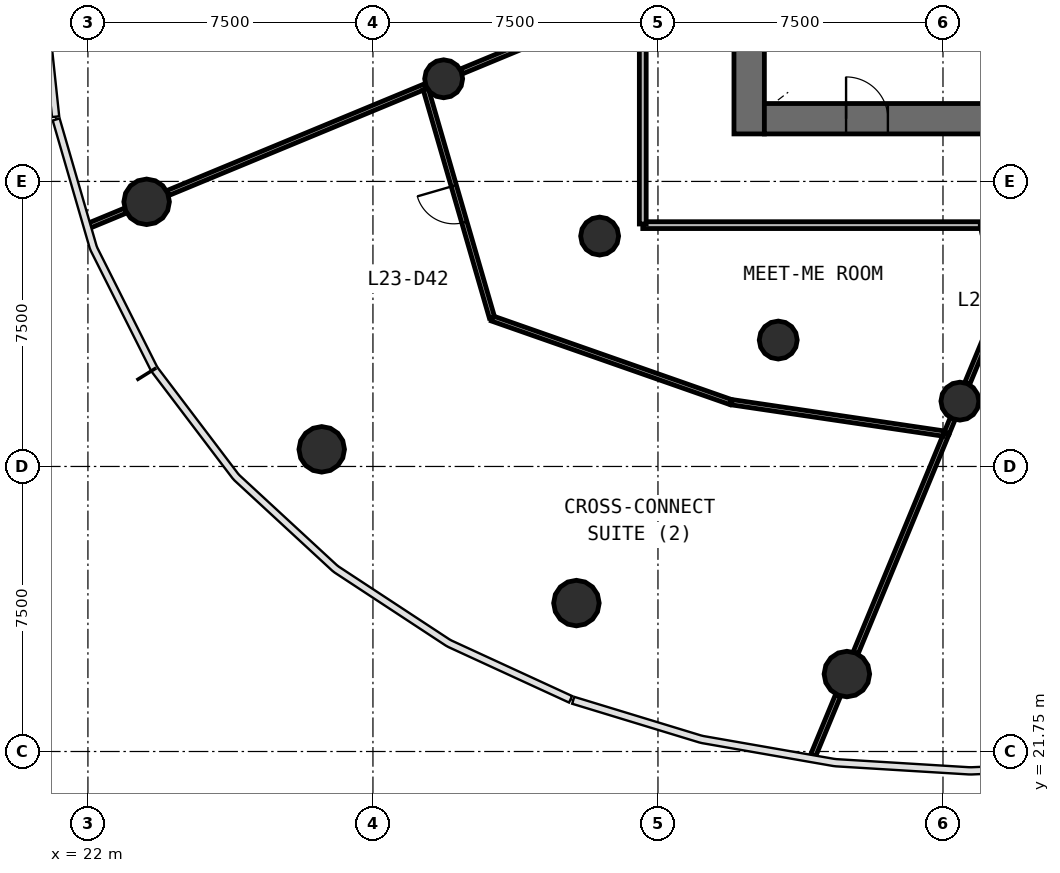
"""IFC4 building model, lengths in metres.
Left out: names, types, materials, properties, quantities, classifications, styles, units other than length and angle.
Written with IfcOpenShell. Run it as: python <this file> out.ifc"""

import sys

from ifc_helpers import new_model, si_unit, direction, frame, frame_2d, origin, origin_2d, place, context, subcontext, project, spatial, rectangle, circle, extrude, source, transform, mapped, element, fill, save


model = new_model("IFC4")
c1 = context("Model", 3, precision=1e-05, world=origin(), true_north=direction((0.0, 1.0)))
c2 = subcontext(c1, "Body", "Model", "MODEL_VIEW")
j1 = project(units=[si_unit("LENGTHUNIT", "METRE"), si_unit("PLANEANGLEUNIT", "RADIAN")], contexts=[c1])
p1 = place(None, origin())
s1 = spatial("IfcSite", under=j1, at=p1, CompositionType="ELEMENT")
p2 = place(p1, origin())
s2 = spatial("IfcBuilding", under=s1, at=p2, CompositionType="ELEMENT")
p3 = place(p2, frame((0.0, 0.0, 100.3)))
s3 = spatial("IfcBuildingStorey", under=s2, at=p3, CompositionType="ELEMENT", Elevation=100.3)
p4 = place(p3, frame((39.4, 58.0, 0.0), z_axis=(0.0, 0.0, 1.0), x_axis=(0.0, -1.0, 0.0)))
e1 = element("IfcWall", 1, at=p4, inside=s3, PredefinedType="SHEAR", context=c2, shape_type="SweptSolid", body=[
    extrude(rectangle(XDim=20.0, YDim=0.8, at=frame_2d((10.0, 0.0))), origin(), (0.0, 0.0, 1.0), 4.1),
])
p5 = place(p4, frame((9.1, 0.0, 0.0)))
e2 = element("IfcOpeningElement", 2, at=p5, cuts=e1, PredefinedType="OPENING", context=c2, shape_type="SweptSolid", body=[
    extrude(rectangle(XDim=1.8, YDim=2.1, at=frame_2d((0.9, 1.05))), frame((0.0, 0.41, 0.0), z_axis=(0.0, -1.0, 0.0), x_axis=(1.0, 0.0, 0.0)), (0.0, 0.0, 1.0), 0.82),
])
p6 = place(p3, frame((39.8, 38.4, 0.0), z_axis=(0.0, 0.0, 1.0), x_axis=(1.0, 0.0, 0.0)))
e3 = element("IfcWall", 3, at=p6, inside=s3, PredefinedType="SHEAR", context=c2, shape_type="SweptSolid", body=[
    extrude(rectangle(XDim=24.4, YDim=0.8, at=frame_2d((12.2, 0.0))), origin(), (0.0, 0.0, 1.0), 4.1),
])
p7 = place(p6, frame((21.65, 0.0, 0.0)))
e4 = element("IfcOpeningElement", 4, at=p7, cuts=e3, PredefinedType="OPENING", context=c2, shape_type="SweptSolid", body=[
    extrude(rectangle(XDim=1.1, YDim=2.1, at=frame_2d((0.55, 1.05))), frame((0.0, 0.41, 0.0), z_axis=(0.0, -1.0, 0.0), x_axis=(1.0, 0.0, 0.0)), (0.0, 0.0, 1.0), 0.82),
])
p8 = place(p6, frame((2.15, 0.0, 0.0)))
e5 = element("IfcOpeningElement", 5, at=p8, cuts=e3, PredefinedType="OPENING", context=c2, shape_type="SweptSolid", body=[
    extrude(rectangle(XDim=1.1, YDim=2.1, at=frame_2d((0.55, 1.05))), frame((0.0, 0.41, 0.0), z_axis=(0.0, -1.0, 0.0), x_axis=(1.0, 0.0, 0.0)), (0.0, 0.0, 1.0), 0.82),
])
m1 = source(origin(), c2, "Body", "SweptSolid", [
    extrude(circle(Radius=0.6, at=origin_2d()), origin(), (0.0, 0.0, 1.0), 4.1),
])
for number, where, z_axis, x_axis in (
    (6, (23.544, 36.213, 0.0), (0.0, 0.0, 1.0), (1.0, 0.0, 0.0)),
    (7, (28.152, 29.701, 0.0), (0.0, 0.0, 1.0), (1.0, 0.0, 0.0)),
    (8, (34.854, 25.655, 0.0), (0.0, 0.0, 1.0), (1.0, 0.0, 0.0)),
    (9, (41.971, 23.788, 0.0), (0.0, 0.0, 1.0), (1.0, 0.0, 0.0)),
):
    element("IfcColumn", number, at=place(p3, frame(where, z_axis=z_axis, x_axis=x_axis)), inside=s3, PredefinedType="COLUMN", context=c2, shape_type="MappedRepresentation", body=[
        mapped(m1, transform((0.0, 0.0, 0.0), scale=1.0)),
    ])
m2 = source(origin(), c2, "Body", "SweptSolid", [
    extrude(circle(Radius=0.5, at=origin_2d()), origin(), (0.0, 0.0, 1.0), 4.1),
])
for number, where, z_axis, x_axis in (
    (10, (31.361, 39.451, 0.0), (0.0, 0.0, 1.0), (1.0, 0.0, 0.0)),
    (11, (35.465, 35.312, 0.0), (0.0, 0.0, 1.0), (1.0, 0.0, 0.0)),
    (12, (40.165, 32.576, 0.0), (0.0, 0.0, 1.0), (1.0, 0.0, 0.0)),
    (13, (44.945, 30.969, 0.0), (0.0, 0.0, 1.0), (1.0, 0.0, 0.0)),
):
    element("IfcColumn", number, at=place(p3, frame(where, z_axis=z_axis, x_axis=x_axis)), inside=s3, PredefinedType="COLUMN", context=c2, shape_type="MappedRepresentation", body=[
        mapped(m2, transform((0.0, 0.0, 0.0), scale=1.0)),
    ])
p9 = place(p3, frame((67.4, 35.6, 0.0), z_axis=(0.0, 0.0, 1.0), x_axis=(-1.0, 0.0, 0.0)))
e14 = element("IfcWall", 14, at=p9, inside=s3, PredefinedType="PARTITIONING", context=c2, shape_type="SweptSolid", body=[
    extrude(rectangle(XDim=30.8, YDim=0.18, at=frame_2d((15.4, 0.0))), origin(), (0.0, 0.0, 1.0), 2.9),
])
p10 = place(p9, frame((9.05, 0.0, 0.0)))
e15 = element("IfcOpeningElement", 15, at=p10, cuts=e14, PredefinedType="OPENING", context=c2, shape_type="SweptSolid", body=[
    extrude(rectangle(XDim=0.9, YDim=2.1, at=frame_2d((0.45, 1.05))), frame((0.0, 0.1, 0.0), z_axis=(0.0, -1.0, 0.0), x_axis=(1.0, 0.0, 0.0)), (0.0, 0.0, 1.0), 0.2),
])
p11 = place(p9, frame((6.05, 0.0, 0.0)))
e16 = element("IfcOpeningElement", 16, at=p11, cuts=e14, PredefinedType="OPENING", context=c2, shape_type="SweptSolid", body=[
    extrude(rectangle(XDim=0.9, YDim=2.1, at=frame_2d((0.45, 1.05))), frame((0.0, 0.1, 0.0), z_axis=(0.0, -1.0, 0.0), x_axis=(1.0, 0.0, 0.0)), (0.0, 0.0, 1.0), 0.2),
])
p12 = place(p9, frame((2.45, 0.0, 0.0)))
e17 = element("IfcOpeningElement", 17, at=p12, cuts=e14, PredefinedType="OPENING", context=c2, shape_type="SweptSolid", body=[
    extrude(rectangle(XDim=0.9, YDim=2.1, at=frame_2d((0.45, 1.05))), frame((0.0, 0.1, 0.0), z_axis=(0.0, -1.0, 0.0), x_axis=(1.0, 0.0, 0.0)), (0.0, 0.0, 1.0), 0.2),
])
p13 = place(p9, frame((20.95, 0.0, 0.0)))
e18 = element("IfcOpeningElement", 18, at=p13, cuts=e14, PredefinedType="OPENING", context=c2, shape_type="SweptSolid", body=[
    extrude(rectangle(XDim=1.0, YDim=2.1, at=frame_2d((0.5, 1.05))), frame((0.0, 0.1, 0.0), z_axis=(0.0, -1.0, 0.0), x_axis=(1.0, 0.0, 0.0)), (0.0, 0.0, 1.0), 0.2),
])
p14 = place(p9, frame((14.95, 0.0, 0.0)))
e19 = element("IfcOpeningElement", 19, at=p14, cuts=e14, PredefinedType="OPENING", context=c2, shape_type="SweptSolid", body=[
    extrude(rectangle(XDim=1.0, YDim=2.1, at=frame_2d((0.5, 1.05))), frame((0.0, 0.1, 0.0), z_axis=(0.0, -1.0, 0.0), x_axis=(1.0, 0.0, 0.0)), (0.0, 0.0, 1.0), 0.2),
])
p15 = place(p9, frame((12.55, 0.0, 0.0)))
e20 = element("IfcOpeningElement", 20, at=p15, cuts=e14, PredefinedType="OPENING", context=c2, shape_type="SweptSolid", body=[
    extrude(rectangle(XDim=1.0, YDim=2.1, at=frame_2d((0.5, 1.05))), frame((0.0, 0.1, 0.0), z_axis=(0.0, -1.0, 0.0), x_axis=(1.0, 0.0, 0.0)), (0.0, 0.0, 1.0), 0.2),
])
p16 = place(p3, frame((36.6, 35.63, 0.0), z_axis=(0.0, 0.0, 1.0), x_axis=(0.0, 1.0, 0.0)))
e21 = element("IfcWall", 21, at=p16, inside=s3, PredefinedType="PARTITIONING", context=c2, shape_type="SweptSolid", body=[
    extrude(rectangle(XDim=23.583, YDim=0.18, at=frame_2d((11.791, 0.0))), origin(), (0.0, 0.0, 1.0), 2.9),
])
p17 = place(p16, frame((11.333, 0.0, 0.0)))
e22 = element("IfcOpeningElement", 22, at=p17, cuts=e21, PredefinedType="OPENING", context=c2, shape_type="SweptSolid", body=[
    extrude(rectangle(XDim=1.0, YDim=2.1, at=frame_2d((0.5, 1.05))), frame((0.0, 0.1, 0.0), z_axis=(0.0, -1.0, 0.0), x_axis=(1.0, 0.0, 0.0)), (0.0, 0.0, 1.0), 0.2),
])
p18 = place(p16, frame((9.133, 0.0, 0.0)))
e23 = element("IfcOpeningElement", 23, at=p18, cuts=e21, PredefinedType="OPENING", context=c2, shape_type="SweptSolid", body=[
    extrude(rectangle(XDim=1.0, YDim=2.1, at=frame_2d((0.5, 1.05))), frame((0.0, 0.1, 0.0), z_axis=(0.0, -1.0, 0.0), x_axis=(1.0, 0.0, 0.0)), (0.0, 0.0, 1.0), 0.2),
])
p19 = place(p3, frame((30.87, 39.248, 0.0), z_axis=(0.0, 0.0, 1.0), x_axis=(-0.923871790576, -0.382702122514, 0.0)))
e24 = element("IfcWall", 24, at=p19, inside=s3, PredefinedType="PARTITIONING", context=c2, shape_type="SweptSolid", body=[
    extrude(rectangle(XDim=7.324, YDim=0.14, at=frame_2d((3.662, 0.0))), origin(), (0.0, 0.0, 1.0), 2.9),
])
p20 = place(p3, frame((32.639, 33.144, 0.0), z_axis=(0.0, 0.0, 1.0), x_axis=(0.943712844309, -0.330765880173, 0.0)))
e25 = element("IfcWall", 25, at=p20, inside=s3, PredefinedType="PARTITIONING", context=c2, shape_type="SweptSolid", body=[
    extrude(rectangle(XDim=6.648, YDim=0.14, at=frame_2d((3.324, 0.0))), origin(), (0.0, 0.0, 1.0), 2.9),
])
p21 = place(p3, frame((32.631, 33.173, 0.0), z_axis=(0.0, 0.0, 1.0), x_axis=(-0.278343340878, 0.960481641984, 0.0)))
e26 = element("IfcWall", 26, at=p21, inside=s3, PredefinedType="PARTITIONING", context=c2, shape_type="SweptSolid", body=[
    extrude(rectangle(XDim=6.255, YDim=0.14, at=frame_2d((3.127, 0.0))), origin(), (0.0, 0.0, 1.0), 2.9),
])
p22 = place(p21, frame((2.604, 0.0, 0.0)))
e27 = element("IfcOpeningElement", 27, at=p22, cuts=e26, PredefinedType="OPENING", context=c2, shape_type="SweptSolid", body=[
    extrude(rectangle(XDim=1.0, YDim=2.1, at=frame_2d((0.5, 1.05))), frame((0.0, 0.08, 0.0), z_axis=(0.0, -1.0, 0.0), x_axis=(1.0, 0.0, 0.0)), (0.0, 0.0, 1.0), 0.16),
])
p23 = place(p3, frame((44.588, 30.106, 0.0), z_axis=(0.0, 0.0, 1.0), x_axis=(-0.382687319502, -0.923877922397, 0.0)))
e28 = element("IfcWall", 28, at=p23, inside=s3, PredefinedType="PARTITIONING", context=c2, shape_type="SweptSolid", body=[
    extrude(rectangle(XDim=6.234, YDim=0.14, at=frame_2d((3.117, 0.0))), origin(), (0.0, 0.0, 1.0), 2.9),
])
p24 = place(p3, frame((38.943, 30.94, 0.0), z_axis=(0.0, 0.0, 1.0), x_axis=(0.98924251215, -0.146284832283, 0.0)))
e29 = element("IfcWall", 29, at=p24, inside=s3, PredefinedType="PARTITIONING", context=c2, shape_type="SweptSolid", body=[
    extrude(rectangle(XDim=5.634, YDim=0.14, at=frame_2d((2.817, 0.0))), origin(), (0.0, 0.0, 1.0), 2.9),
])
p25 = place(p3, frame((36.51, 41.584, 0.0), z_axis=(0.0, 0.0, 1.0), x_axis=(-0.923890025086, -0.382658100067, 0.0)))
e30 = element("IfcWall", 30, at=p25, inside=s3, PredefinedType="PARTITIONING", context=c2, shape_type="SweptSolid", body=[
    extrude(rectangle(XDim=5.068, YDim=0.14, at=frame_2d((2.534, 0.0))), origin(), (0.0, 0.0, 1.0), 2.9),
])
p26 = place(p3, frame((46.826, 35.51, 0.0), z_axis=(0.0, 0.0, 1.0), x_axis=(-0.382672831764, -0.923883923353, 0.0)))
e31 = element("IfcWall", 31, at=p26, inside=s3, PredefinedType="PARTITIONING", context=c2, shape_type="SweptSolid", body=[
    extrude(rectangle(XDim=4.41, YDim=0.14, at=frame_2d((2.205, 0.0))), origin(), (0.0, 0.0, 1.0), 2.9),
])
p27 = place(p3, frame((41.74, 23.229, 0.0), z_axis=(0.0, 0.0, 1.0), x_axis=(-0.382769756697, -0.923843771077, 0.0)))
e32 = element("IfcWall", 32, at=p27, inside=s3, PredefinedType="PARTITIONING", context=c2, shape_type="SweptSolid", body=[
    extrude(rectangle(XDim=1.719, YDim=0.14, at=frame_2d((0.86, 0.0))), origin(), (0.0, 0.0, 1.0), 2.9),
])
p28 = place(p3, frame((22.986, 35.982, 0.0), z_axis=(0.0, 0.0, 1.0), x_axis=(-0.923909071339, -0.38261211154, 0.0)))
e33 = element("IfcWall", 33, at=p28, inside=s3, PredefinedType="PARTITIONING", context=c2, shape_type="SweptSolid", body=[
    extrude(rectangle(XDim=1.021, YDim=0.14, at=frame_2d((0.511, 0.0))), origin(), (0.0, 0.0, 1.0), 2.9),
])
p29 = place(p3, frame((44.752, 30.502, 0.0), z_axis=(0.0, 0.0, 1.0), x_axis=(-0.382441868588, -0.923979554509, 0.0)))
e34 = element("IfcWall", 34, at=p29, inside=s3, PredefinedType="PARTITIONING", context=c2, shape_type="SweptSolid", body=[
    extrude(rectangle(XDim=0.399, YDim=0.14, at=frame_2d((0.199, 0.0))), origin(), (0.0, 0.0, 1.0), 2.9),
])
m3 = source(origin(), c2, "Body", "SweptSolid", [
    extrude(rectangle(XDim=1.1, YDim=2.1, at=frame_2d((0.55, 1.05))), frame((0.0, 0.025, 0.0), z_axis=(0.0, -1.0, 0.0), x_axis=(1.0, 0.0, 0.0)), (0.0, 0.0, 1.0), 0.05),
])
p30 = place(p8, origin())
e35 = element("IfcDoor", 35, at=p30, inside=s3, OperationType="SINGLE_SWING_LEFT", PredefinedType="DOOR", context=c2, shape_type="MappedRepresentation", body=[
    mapped(m3, transform((0.0, 0.0, 0.0), scale=1.0)),
])
fill(e5, e35)
m4 = source(origin(), c2, "Body", "SweptSolid", [
    extrude(rectangle(XDim=1.0, YDim=2.1, at=frame_2d((0.5, 1.05))), frame((0.0, 0.025, 0.0), z_axis=(0.0, -1.0, 0.0), x_axis=(1.0, 0.0, 0.0)), (0.0, 0.0, 1.0), 0.05),
])
p31 = place(p13, origin())
e36 = element("IfcDoor", 36, at=p31, inside=s3, OperationType="SINGLE_SWING_LEFT", PredefinedType="DOOR", context=c2, shape_type="MappedRepresentation", body=[
    mapped(m4, transform((0.0, 0.0, 0.0), scale=1.0)),
])
fill(e18, e36)
p32 = place(p22, origin())
e37 = element("IfcDoor", 37, at=p32, inside=s3, OperationType="SINGLE_SWING_RIGHT", PredefinedType="DOOR", context=c2, shape_type="MappedRepresentation", body=[
    mapped(m4, transform((0.0, 0.0, 0.0), scale=1.0)),
])
fill(e27, e37)
save(model, sys.argv[1])
